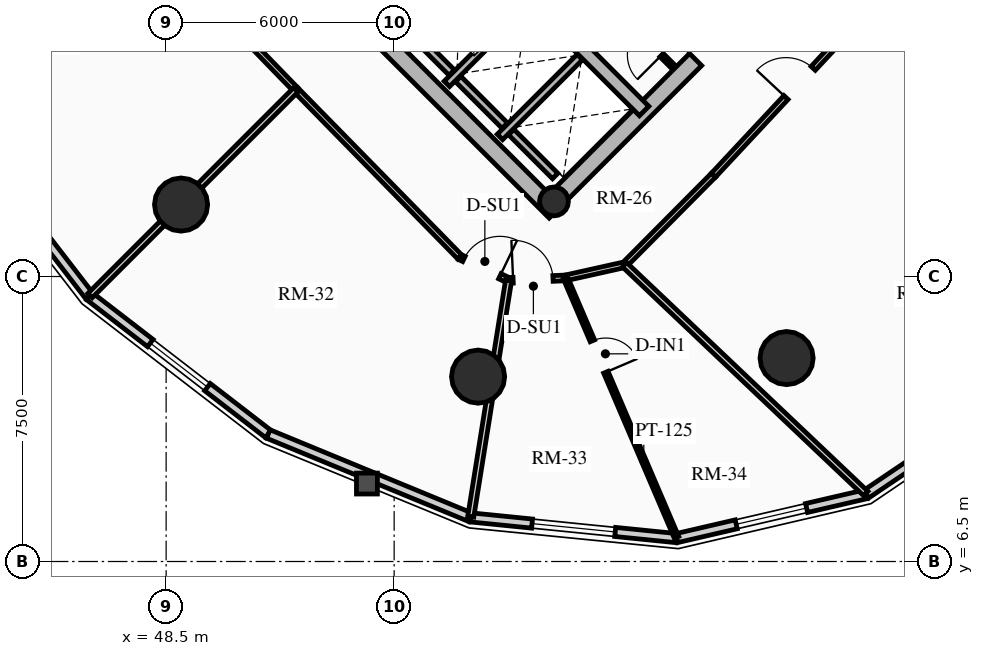
"""IFC4 building model, lengths in metres.
Left out: names, types, materials, properties, quantities, classifications, styles, units other than length and angle.
Written with IfcOpenShell. Run it as: python <this file> out.ifc"""

import sys

from ifc_helpers import new_model, si_unit, direction, frame, frame_2d, origin, origin_2d, place, context, subcontext, project, spatial, rectangle, circle, hollow_circle, extrude, source, transform, mapped, element, fill, save


model = new_model("IFC4")
c1 = context("Model", 3, precision=1e-05, world=origin(), true_north=direction((0.0, 1.0)))
c2 = subcontext(c1, "Body", "Model", "MODEL_VIEW")
j1 = project(units=[si_unit("LENGTHUNIT", "METRE"), si_unit("PLANEANGLEUNIT", "RADIAN")], contexts=[c1])
p1 = place(None, origin())
s1 = spatial("IfcSite", under=j1, at=p1, CompositionType="ELEMENT")
p2 = place(p1, origin())
s2 = spatial("IfcBuilding", under=s1, at=p2, CompositionType="ELEMENT")
p3 = place(p2, frame((0.0, 0.0, 78.88)))
s3 = spatial("IfcBuildingStorey", under=s2, at=p3, CompositionType="ELEMENT", Elevation=78.88)
p4 = place(p3, frame((58.737, 15.697, 0.0), z_axis=(0.0, 0.0, 1.0), x_axis=(-0.707106781187, 0.707106781187, 0.0)))
e1 = element("IfcWall", 1, at=p4, inside=s3, PredefinedType="SHEAR", context=c2, shape_type="SweptSolid", body=[
    extrude(rectangle(XDim=14.2, YDim=0.45, at=frame_2d((7.1, 0.0))), origin(), (0.0, 0.0, 1.0), 2.91),
])
p5 = place(p3, frame((58.578, 15.856, 0.0), z_axis=(0.0, 0.0, 1.0), x_axis=(0.707106781187, 0.707106781187, 0.0)))
e2 = element("IfcWall", 2, at=p5, inside=s3, PredefinedType="SHEAR", context=c2, shape_type="SweptSolid", body=[
    extrude(rectangle(XDim=10.7, YDim=0.45, at=frame_2d((5.35, 0.0))), origin(), (0.0, 0.0, 1.0), 2.91),
])
m1 = source(origin(), c2, "Body", "SweptSolid", [
    extrude(rectangle(XDim=1.5, YDim=2.02, at=frame_2d((0.75, 1.01))), frame((0.0, 0.235, 0.0), z_axis=(0.0, -1.0, 0.0), x_axis=(1.0, 0.0, 0.0)), (0.0, 0.0, 1.0), 0.47),
])
p6 = place(p5, frame((5.45, 0.0, 0.0)))
e3 = element("IfcOpeningElement", 3, at=p6, cuts=e2, PredefinedType="OPENING", context=c2, shape_type="MappedRepresentation", body=[
    mapped(m1, transform((0.0, 0.0, 0.0), x_axis=(1.0, 0.0, 0.0), y_axis=(0.0, 1.0, 0.0), z_axis=(0.0, 0.0, 1.0), scale=1.0)),
])
p7 = place(p3, frame((61.078, 18.355, 0.0), z_axis=(0.0, 0.0, 1.0), x_axis=(-0.707106781187, 0.707106781187, 0.0)))
e4 = element("IfcWall", 4, at=p7, inside=s3, PredefinedType="SHEAR", context=c2, shape_type="SweptSolid", body=[
    extrude(rectangle(XDim=13.75, YDim=0.35, at=frame_2d((6.875, 0.0))), origin(), (0.0, 0.0, 1.0), 2.91),
])
m2 = source(origin(), c2, "Body", "SweptSolid", [
    extrude(rectangle(XDim=1.1, YDim=2.015, at=frame_2d((0.55, 1.007))), frame((0.0, 0.185, 0.0), z_axis=(0.0, -1.0, 0.0), x_axis=(1.0, 0.0, 0.0)), (0.0, 0.0, 1.0), 0.37),
])
p8 = place(p7, frame((4.875, 0.0, 0.0)))
e5 = element("IfcOpeningElement", 5, at=p8, cuts=e4, PredefinedType="OPENING", context=c2, shape_type="MappedRepresentation", body=[
    mapped(m2, transform((0.0, 0.0, 0.0), x_axis=(1.0, 0.0, 0.0), y_axis=(0.0, 1.0, 0.0), z_axis=(0.0, 0.0, 1.0), scale=1.0)),
])
m3 = source(origin(), c2, "Body", "SweptSolid", [
    extrude(rectangle(XDim=1.15, YDim=2.02, at=frame_2d((0.575, 1.01))), frame((0.0, 0.185, 0.0), z_axis=(0.0, -1.0, 0.0), x_axis=(1.0, 0.0, 0.0)), (0.0, 0.0, 1.0), 0.37),
])
p9 = place(p7, frame((7.295, 0.0, 0.0)))
e6 = element("IfcOpeningElement", 6, at=p9, cuts=e4, PredefinedType="OPENING", context=c2, shape_type="MappedRepresentation", body=[
    mapped(m3, transform((0.0, 0.0, 0.0), x_axis=(1.0, 0.0, 0.0), y_axis=(0.0, 1.0, 0.0), z_axis=(0.0, 0.0, 1.0), scale=1.0)),
])
p10 = place(p3, frame((58.706, 15.976, 0.0), z_axis=(0.0, 0.0, 1.0), x_axis=(0.707106781187, 0.707106781187, 0.0)))
e7 = element("IfcColumn", 7, at=p10, inside=s3, PredefinedType="COLUMN", context=c2, shape_type="SweptSolid", body=[
    extrude(hollow_circle(Radius=0.38, WallThickness=0.032, at=origin_2d()), origin(), (0.0, 0.0, 1.0), 2.91),
])
for number, where, z_axis, x_axis in (
    (8, (48.893, 15.893, 0.0), (0.0, 0.0, 1.0), (1.0, 0.0, 0.0)),
    (9, (56.709, 11.365, 0.0), (0.0, 0.0, 1.0), (1.0, 0.0, 0.0)),
    (10, (64.827, 11.854, 0.0), (0.0, 0.0, 1.0), (1.0, 0.0, 0.0)),
):
    element("IfcColumn", number, at=place(p3, frame(where, z_axis=z_axis, x_axis=x_axis)), inside=s3, PredefinedType="USERDEFINED", context=c2, shape_type="SweptSolid", body=[
        extrude(circle(Radius=0.7, at=origin_2d()), origin(), (0.0, 0.0, 1.0), 2.91),
    ])
p11 = place(p3, frame((46.483, 13.483, 0.0), z_axis=(0.0, 0.0, 1.0), x_axis=(-0.61054437102, 0.791982052206, 0.0)))
e11 = element("IfcWall", 11, at=p11, inside=s3, PredefinedType="SOLIDWALL", context=c2, shape_type="SweptSolid", body=[
    extrude(rectangle(XDim=5.942, YDim=0.24, at=frame_2d((2.971, 0.0))), origin(), (0.0, 0.0, 1.0), 2.179),
])
p12 = place(p3, frame((51.189, 9.855, 0.0), z_axis=(0.0, 0.0, 1.0), x_axis=(-0.791982052206, 0.61054437102, 0.0)))
e12 = element("IfcWall", 12, at=p12, inside=s3, PredefinedType="SOLIDWALL", context=c2, shape_type="SweptSolid", body=[
    extrude(rectangle(XDim=5.942, YDim=0.24, at=frame_2d((2.971, 0.0))), origin(), (0.0, 0.0, 1.0), 2.179),
])
m4 = source(origin(), c2, "Body", "SweptSolid", [
    extrude(rectangle(XDim=1.9, YDim=1.35, at=frame_2d((0.95, 0.675))), frame((0.0, 0.13, 0.0), z_axis=(0.0, -1.0, 0.0), x_axis=(1.0, 0.0, 0.0)), (0.0, 0.0, 1.0), 0.26),
])
p13 = place(p12, frame((2.021, 0.0, 0.65)))
e13 = element("IfcOpeningElement", 13, at=p13, cuts=e12, PredefinedType="OPENING", context=c2, shape_type="MappedRepresentation", body=[
    mapped(m4, transform((0.0, 0.0, 0.0), x_axis=(1.0, 0.0, 0.0), y_axis=(0.0, 1.0, 0.0), z_axis=(0.0, 0.0, 1.0), scale=1.0)),
])
p14 = place(p3, frame((56.513, 7.661, 0.0), z_axis=(0.0, 0.0, 1.0), x_axis=(-0.924563909604, 0.381027003055, 0.0)))
e14 = element("IfcWall", 14, at=p14, inside=s3, PredefinedType="SOLIDWALL", context=c2, shape_type="SweptSolid", body=[
    extrude(rectangle(XDim=5.758, YDim=0.24, at=frame_2d((2.879, 0.0))), origin(), (0.0, 0.0, 1.0), 2.179),
])
p15 = place(p3, frame((61.933, 7.115, 0.0), z_axis=(0.0, 0.0, 1.0), x_axis=(-0.994971754311, 0.10015591906, 0.0)))
e15 = element("IfcWall", 15, at=p15, inside=s3, PredefinedType="SOLIDWALL", context=c2, shape_type="SweptSolid", body=[
    extrude(rectangle(XDim=5.448, YDim=0.24, at=frame_2d((2.724, 0.0))), origin(), (0.0, 0.0, 1.0), 2.179),
])
m5 = source(origin(), c2, "Body", "SweptSolid", [
    extrude(rectangle(XDim=2.2, YDim=1.35, at=frame_2d((1.1, 0.675))), frame((0.0, 0.13, 0.0), z_axis=(0.0, -1.0, 0.0), x_axis=(1.0, 0.0, 0.0)), (0.0, 0.0, 1.0), 0.26),
])
p16 = place(p15, frame((1.624, 0.0, 0.65)))
e16 = element("IfcOpeningElement", 16, at=p16, cuts=e15, PredefinedType="OPENING", context=c2, shape_type="MappedRepresentation", body=[
    mapped(m5, transform((0.0, 0.0, 0.0), x_axis=(1.0, 0.0, 0.0), y_axis=(0.0, 1.0, 0.0), z_axis=(0.0, 0.0, 1.0), scale=1.0)),
])
p17 = place(p3, frame((66.92, 8.271, 0.0), z_axis=(0.0, 0.0, 1.0), x_axis=(-0.974165631126, -0.225834725257, 0.0)))
e17 = element("IfcWall", 17, at=p17, inside=s3, PredefinedType="SOLIDWALL", context=c2, shape_type="SweptSolid", body=[
    extrude(rectangle(XDim=5.119, YDim=0.24, at=frame_2d((2.56, 0.0))), origin(), (0.0, 0.0, 1.0), 2.179),
])
p18 = place(p17, frame((1.609, 0.0, 0.65)))
e18 = element("IfcOpeningElement", 18, at=p18, cuts=e17, PredefinedType="OPENING", context=c2, shape_type="MappedRepresentation", body=[
    mapped(m4, transform((0.0, 0.0, 0.0), x_axis=(1.0, 0.0, 0.0), y_axis=(0.0, 1.0, 0.0), z_axis=(0.0, 0.0, 1.0), scale=1.0)),
])
p19 = place(p3, frame((70.985, 11.015, 0.0), z_axis=(0.0, 0.0, 1.0), x_axis=(-0.828781148131, -0.559572880421, 0.0)))
e19 = element("IfcWall", 19, at=p19, inside=s3, PredefinedType="SOLIDWALL", context=c2, shape_type="SweptSolid", body=[
    extrude(rectangle(XDim=4.905, YDim=0.24, at=frame_2d((2.452, 0.0))), origin(), (0.0, 0.0, 1.0), 2.179),
])
p20 = place(p3, frame((55.888, 19.069, 0.0), z_axis=(0.0, 0.0, 1.0), x_axis=(0.707106781187, 0.707106781187, 0.0)))
e20 = element("IfcWall", 20, at=p20, inside=s3, PredefinedType="SHEAR", context=c2, shape_type="SweptSolid", body=[
    extrude(rectangle(XDim=2.97, YDim=0.2, at=frame_2d((1.485, 0.0))), origin(), (0.0, 0.0, 1.0), 2.91),
])
p21 = place(p3, frame((56.015, 19.366, 0.0), z_axis=(0.0, 0.0, 1.0), x_axis=(-0.707106781187, 0.707106781187, 0.0)))
e21 = element("IfcWall", 21, at=p21, inside=s3, PredefinedType="SHEAR", context=c2, shape_type="SweptSolid", body=[
    extrude(rectangle(XDim=2.44, YDim=0.2, at=frame_2d((1.22, 0.0))), origin(), (0.0, 0.0, 1.0), 2.91),
])
p22 = place(p3, frame((57.284, 17.673, 0.0), z_axis=(0.0, 0.0, 1.0), x_axis=(0.707147878904, 0.70706568108, 0.0)))
e22 = element("IfcWall", 22, at=p22, inside=s3, PredefinedType="SHEAR", context=c2, shape_type="SweptSolid", body=[
    extrude(rectangle(XDim=2.97, YDim=0.2, at=frame_2d((1.485, 0.0))), origin(), (0.0, 0.0, 1.0), 2.91),
])
p23 = place(p3, frame((57.412, 17.97, 0.0), z_axis=(0.0, 0.0, 1.0), x_axis=(-0.707106781187, 0.707106781187, 0.0)))
e23 = element("IfcWall", 23, at=p23, inside=s3, PredefinedType="SHEAR", context=c2, shape_type="SweptSolid", body=[
    extrude(rectangle(XDim=1.735, YDim=0.2, at=frame_2d((0.867, 0.0))), origin(), (0.0, 0.0, 1.0), 2.91),
])
p24 = place(p3, frame((58.737, 16.644, 0.0), z_axis=(0.0, 0.0, 1.0), x_axis=(-0.707032117043, 0.707181437447, 0.0)))
e24 = element("IfcWall", 24, at=p24, inside=s3, PredefinedType="SHEAR", context=c2, shape_type="SweptSolid", body=[
    extrude(rectangle(XDim=1.635, YDim=0.2, at=frame_2d((0.817, 0.0))), origin(), (0.0, 0.0, 1.0), 2.91),
])
p25 = place(p3, frame((61.835, 19.529, 0.0), z_axis=(0.0, 0.0, 1.0), x_axis=(-0.707174592913, 0.707038962956, 0.0)))
e25 = element("IfcWall", 25, at=p25, inside=s3, PredefinedType="PARTITIONING", context=c2, shape_type="SweptSolid", body=[
    extrude(rectangle(XDim=1.8, YDim=0.125, at=frame_2d((0.9, 0.0))), origin(), (0.0, 0.0, 1.0), 2.655),
])
m6 = source(origin(), c2, "Body", "SweptSolid", [
    extrude(rectangle(XDim=0.9, YDim=2.005, at=frame_2d((0.45, 1.002))), frame((0.0, 0.073, 0.0), z_axis=(0.0, -1.0, 0.0), x_axis=(1.0, 0.0, 0.0)), (0.0, 0.0, 1.0), 0.145),
])
p26 = place(p25, frame((0.42, 0.0, 0.0)))
e26 = element("IfcOpeningElement", 26, at=p26, cuts=e25, PredefinedType="OPENING", context=c2, shape_type="MappedRepresentation", body=[
    mapped(m6, transform((0.0, 0.0, 0.0), x_axis=(1.0, 0.0, 0.0), y_axis=(0.0, 1.0, 0.0), z_axis=(0.0, 0.0, 1.0), scale=1.0)),
])
p27 = place(p3, frame((47.706, 23.253, 0.0), z_axis=(0.0, 0.0, 1.0), x_axis=(0.696179266346, -0.717867974707, 0.0)))
e27 = element("IfcWall", 27, at=p27, inside=s3, PredefinedType="PARTITIONING", context=c2, shape_type="SweptSolid", body=[
    extrude(rectangle(XDim=6.045, YDim=0.15, at=frame_2d((3.022, 0.0))), origin(), (0.0, 0.0, 1.0), 2.655),
])
m7 = source(origin(), c2, "Body", "SweptSolid", [
    extrude(rectangle(XDim=1.05, YDim=2.015, at=frame_2d((0.525, 1.007))), frame((0.0, 0.085, 0.0), z_axis=(0.0, -1.0, 0.0), x_axis=(1.0, 0.0, 0.0)), (0.0, 0.0, 1.0), 0.17),
])
p28 = place(p27, frame((2.497, 0.0, 0.0)))
e28 = element("IfcOpeningElement", 28, at=p28, cuts=e27, PredefinedType="OPENING", context=c2, shape_type="MappedRepresentation", body=[
    mapped(m7, transform((0.0, 0.0, 0.0), x_axis=(1.0, 0.0, 0.0), y_axis=(0.0, 1.0, 0.0), z_axis=(0.0, 0.0, 1.0), scale=1.0)),
])
p29 = place(p3, frame((51.914, 18.914, 0.0), z_axis=(0.0, 0.0, 1.0), x_axis=(0.699999313799, -0.714143515465, 0.0)))
e29 = element("IfcWall", 29, at=p29, inside=s3, PredefinedType="PARTITIONING", context=c2, shape_type="SweptSolid", body=[
    extrude(rectangle(XDim=6.162, YDim=0.15, at=frame_2d((3.081, 0.0))), origin(), (0.0, 0.0, 1.0), 2.225),
])
p30 = place(p3, frame((56.227, 14.513, 0.0), z_axis=(0.0, 0.0, 1.0), x_axis=(0.901477579283, -0.432825801044, 0.0)))
e30 = element("IfcWall", 30, at=p30, inside=s3, PredefinedType="PARTITIONING", context=c2, shape_type="SweptSolid", body=[
    extrude(rectangle(XDim=1.424, YDim=0.15, at=frame_2d((0.712, 0.0))), origin(), (0.0, 0.0, 1.0), 2.225),
])
p31 = place(p30, frame((0.12, 0.0, 0.0)))
e31 = element("IfcOpeningElement", 31, at=p31, cuts=e30, PredefinedType="OPENING", context=c2, shape_type="MappedRepresentation", body=[
    mapped(m7, transform((0.0, 0.0, 0.0), x_axis=(1.0, 0.0, 0.0), y_axis=(0.0, 1.0, 0.0), z_axis=(0.0, 0.0, 1.0), scale=1.0)),
])
p32 = place(p3, frame((57.511, 13.897, 0.0), z_axis=(0.0, 0.0, 1.0), x_axis=(0.999024538494, 0.044158481476, 0.0)))
e32 = element("IfcWall", 32, at=p32, inside=s3, PredefinedType="PARTITIONING", context=c2, shape_type="SweptSolid", body=[
    extrude(rectangle(XDim=1.498, YDim=0.15, at=frame_2d((0.749, 0.0))), origin(), (0.0, 0.0, 1.0), 2.225),
])
p33 = place(p32, frame((0.12, 0.0, 0.0)))
e33 = element("IfcOpeningElement", 33, at=p33, cuts=e32, PredefinedType="OPENING", context=c2, shape_type="MappedRepresentation", body=[
    mapped(m7, transform((0.0, 0.0, 0.0), x_axis=(1.0, 0.0, 0.0), y_axis=(0.0, 1.0, 0.0), z_axis=(0.0, 0.0, 1.0), scale=1.0)),
])
p34 = place(p3, frame((59.008, 13.963, 0.0), z_axis=(0.0, 0.0, 1.0), x_axis=(0.976020856791, 0.21767702476, 0.0)))
e34 = element("IfcWall", 34, at=p34, inside=s3, PredefinedType="PARTITIONING", context=c2, shape_type="SweptSolid", body=[
    extrude(rectangle(XDim=1.593, YDim=0.15, at=frame_2d((0.796, 0.0))), origin(), (0.0, 0.0, 1.0), 2.225),
])
p35 = place(p3, frame((60.562, 14.31, 0.0), z_axis=(0.0, 0.0, 1.0), x_axis=(0.704566236161, 0.709638230975, 0.0)))
e35 = element("IfcWall", 35, at=p35, inside=s3, PredefinedType="PARTITIONING", context=c2, shape_type="SweptSolid", body=[
    extrude(rectangle(XDim=3.321, YDim=0.15, at=frame_2d((1.661, 0.0))), origin(), (0.0, 0.0, 1.0), 2.225),
])
p36 = place(p3, frame((62.903, 16.667, 0.0), z_axis=(0.0, 0.0, 1.0), x_axis=(0.682371947497, 0.731005147225, 0.0)))
e36 = element("IfcWall", 36, at=p36, inside=s3, PredefinedType="PARTITIONING", context=c2, shape_type="SweptSolid", body=[
    extrude(rectangle(XDim=6.642, YDim=0.15, at=frame_2d((3.321, 0.0))), origin(), (0.0, 0.0, 1.0), 2.225),
])
p37 = place(p36, frame((2.796, 0.0, 0.0)))
e37 = element("IfcOpeningElement", 37, at=p37, cuts=e36, PredefinedType="OPENING", context=c2, shape_type="MappedRepresentation", body=[
    mapped(m7, transform((0.0, 0.0, 0.0), x_axis=(1.0, 0.0, 0.0), y_axis=(0.0, 1.0, 0.0), z_axis=(0.0, 0.0, 1.0), scale=1.0)),
])
p38 = place(p3, frame((51.914, 18.914, 0.0), z_axis=(0.0, 0.0, 1.0), x_axis=(-0.707106781187, -0.707106781187, 0.0)))
e38 = element("IfcWall", 38, at=p38, inside=s3, PredefinedType="PARTITIONING", context=c2, shape_type="SweptSolid", body=[
    extrude(rectangle(XDim=7.661, YDim=0.16, at=frame_2d((3.831, 0.0))), origin(), (0.0, 0.0, 1.0), 2.179),
])
p39 = place(p3, frame((57.511, 13.897, 0.0), z_axis=(0.0, 0.0, 1.0), x_axis=(-0.15810696167, -0.987421991183, 0.0)))
e39 = element("IfcWall", 39, at=p39, inside=s3, PredefinedType="PARTITIONING", context=c2, shape_type="SweptSolid", body=[
    extrude(rectangle(XDim=6.295, YDim=0.16, at=frame_2d((3.148, 0.0))), origin(), (0.0, 0.0, 1.0), 2.179),
])
p40 = place(p3, frame((60.562, 14.31, 0.0), z_axis=(0.0, 0.0, 1.0), x_axis=(0.725582293335, -0.688135404989, 0.0)))
e40 = element("IfcWall", 40, at=p40, inside=s3, PredefinedType="PARTITIONING", context=c2, shape_type="SweptSolid", body=[
    extrude(rectangle(XDim=8.749, YDim=0.16, at=frame_2d((4.375, 0.0))), origin(), (0.0, 0.0, 1.0), 2.179),
])
p41 = place(p3, frame((67.435, 21.521, 0.0), z_axis=(0.0, 0.0, 1.0), x_axis=(0.6983880073, -0.715719352302, 0.0)))
e41 = element("IfcWall", 41, at=p41, inside=s3, PredefinedType="PARTITIONING", context=c2, shape_type="SweptSolid", body=[
    extrude(rectangle(XDim=8.987, YDim=0.16, at=frame_2d((4.494, 0.0))), origin(), (0.0, 0.0, 1.0), 2.179),
])
p42 = place(p3, frame((59.008, 13.963, 0.0), z_axis=(0.0, 0.0, 1.0), x_axis=(0.393439207333, -0.919350635032, 0.0)))
e42 = element("IfcWall", 42, at=p42, inside=s3, PredefinedType="PARTITIONING", context=c2, shape_type="SweptSolid", body=[
    extrude(rectangle(XDim=7.427, YDim=0.125, at=frame_2d((3.713, 0.0))), origin(), (0.0, 0.0, 1.0), 2.179),
])
p43 = place(p42, frame((1.8, 0.0, 0.0)))
e43 = element("IfcOpeningElement", 43, at=p43, cuts=e42, PredefinedType="OPENING", context=c2, shape_type="MappedRepresentation", body=[
    mapped(m6, transform((0.0, 0.0, 0.0), x_axis=(1.0, 0.0, 0.0), y_axis=(0.0, 1.0, 0.0), z_axis=(0.0, 0.0, 1.0), scale=1.0)),
])
m8 = source(origin(), c2, "Body", "SweptSolid", [
    extrude(rectangle(XDim=1.9, YDim=1.35, at=frame_2d((0.95, 0.675))), frame((0.0, 0.03, 0.0), z_axis=(0.0, -1.0, 0.0), x_axis=(1.0, 0.0, 0.0)), (0.0, 0.0, 1.0), 0.06),
])
p44 = place(p13, origin())
e44 = element("IfcWindow", 44, at=p44, inside=s3, PartitioningType="DOUBLE_PANEL_VERTICAL", PredefinedType="WINDOW", context=c2, shape_type="MappedRepresentation", body=[
    mapped(m8, transform((0.0, 0.0, 0.0), x_axis=(1.0, 0.0, 0.0), y_axis=(0.0, 1.0, 0.0), z_axis=(0.0, 0.0, 1.0), scale=1.0)),
])
fill(e13, e44)
m9 = source(origin(), c2, "Body", "SweptSolid", [
    extrude(rectangle(XDim=2.2, YDim=1.35, at=frame_2d((1.1, 0.675))), frame((0.0, 0.03, 0.0), z_axis=(0.0, -1.0, 0.0), x_axis=(1.0, 0.0, 0.0)), (0.0, 0.0, 1.0), 0.06),
])
p45 = place(p16, origin())
e45 = element("IfcWindow", 45, at=p45, inside=s3, PartitioningType="DOUBLE_PANEL_VERTICAL", PredefinedType="WINDOW", context=c2, shape_type="MappedRepresentation", body=[
    mapped(m9, transform((0.0, 0.0, 0.0), x_axis=(1.0, 0.0, 0.0), y_axis=(0.0, 1.0, 0.0), z_axis=(0.0, 0.0, 1.0), scale=1.0)),
])
fill(e16, e45)
p46 = place(p18, origin())
e46 = element("IfcWindow", 46, at=p46, inside=s3, PartitioningType="DOUBLE_PANEL_VERTICAL", PredefinedType="WINDOW", context=c2, shape_type="MappedRepresentation", body=[
    mapped(m8, transform((0.0, 0.0, 0.0), x_axis=(1.0, 0.0, 0.0), y_axis=(0.0, 1.0, 0.0), z_axis=(0.0, 0.0, 1.0), scale=1.0)),
])
fill(e18, e46)
m10 = source(origin(), c2, "Body", "SweptSolid", [
    extrude(rectangle(XDim=1.5, YDim=2.02, at=frame_2d((0.75, 1.01))), frame((0.0, 0.025, 0.0), z_axis=(0.0, -1.0, 0.0), x_axis=(1.0, 0.0, 0.0)), (0.0, 0.0, 1.0), 0.05),
])
p47 = place(p6, origin())
e47 = element("IfcDoor", 47, at=p47, inside=s3, OperationType="DOUBLE_DOOR_SINGLE_SWING", PredefinedType="DOOR", context=c2, shape_type="MappedRepresentation", body=[
    mapped(m10, transform((0.0, 0.0, 0.0), x_axis=(1.0, 0.0, 0.0), y_axis=(0.0, 1.0, 0.0), z_axis=(0.0, 0.0, 1.0), scale=1.0)),
])
fill(e3, e47)
m11 = source(origin(), c2, "Body", "SweptSolid", [
    extrude(rectangle(XDim=0.9, YDim=2.005, at=frame_2d((0.45, 1.002))), frame((0.0, 0.025, 0.0), z_axis=(0.0, -1.0, 0.0), x_axis=(1.0, 0.0, 0.0)), (0.0, 0.0, 1.0), 0.05),
])
p48 = place(p26, origin())
e48 = element("IfcDoor", 48, at=p48, inside=s3, OperationType="SINGLE_SWING_LEFT", PredefinedType="DOOR", context=c2, shape_type="MappedRepresentation", body=[
    mapped(m11, transform((0.0, 0.0, 0.0), x_axis=(1.0, 0.0, 0.0), y_axis=(0.0, 1.0, 0.0), z_axis=(0.0, 0.0, 1.0), scale=1.0)),
])
fill(e26, e48)
m12 = source(origin(), c2, "Body", "SweptSolid", [
    extrude(rectangle(XDim=1.05, YDim=2.015, at=frame_2d((0.525, 1.007))), frame((0.0, 0.025, 0.0), z_axis=(0.0, -1.0, 0.0), x_axis=(1.0, 0.0, 0.0)), (0.0, 0.0, 1.0), 0.05),
])
p49 = place(p31, origin())
e49 = element("IfcDoor", 49, at=p49, inside=s3, OperationType="SINGLE_SWING_RIGHT", PredefinedType="DOOR", context=c2, shape_type="MappedRepresentation", body=[
    mapped(m12, transform((0.0, 0.0, 0.0), x_axis=(1.0, 0.0, 0.0), y_axis=(0.0, 1.0, 0.0), z_axis=(0.0, 0.0, 1.0), scale=1.0)),
])
fill(e31, e49)
p50 = place(p33, origin())
e50 = element("IfcDoor", 50, at=p50, inside=s3, OperationType="SINGLE_SWING_LEFT", PredefinedType="DOOR", context=c2, shape_type="MappedRepresentation", body=[
    mapped(m12, transform((0.0, 0.0, 0.0), x_axis=(1.0, 0.0, 0.0), y_axis=(0.0, 1.0, 0.0), z_axis=(0.0, 0.0, 1.0), scale=1.0)),
])
fill(e33, e50)
p51 = place(p43, origin())
e51 = element("IfcDoor", 51, at=p51, inside=s3, OperationType="SINGLE_SWING_RIGHT", PredefinedType="DOOR", context=c2, shape_type="MappedRepresentation", body=[
    mapped(m11, transform((0.0, 0.0, 0.0), x_axis=(1.0, 0.0, 0.0), y_axis=(0.0, 1.0, 0.0), z_axis=(0.0, 0.0, 1.0), scale=1.0)),
])
fill(e43, e51)
p52 = place(p37, origin())
e52 = element("IfcDoor", 52, at=p52, inside=s3, OperationType="SINGLE_SWING_LEFT", PredefinedType="DOOR", context=c2, shape_type="MappedRepresentation", body=[
    mapped(m12, transform((0.0, 0.0, 0.0), x_axis=(1.0, 0.0, 0.0), y_axis=(0.0, 1.0, 0.0), z_axis=(0.0, 0.0, 1.0), scale=1.0)),
])
fill(e37, e52)
save(model, sys.argv[1])
